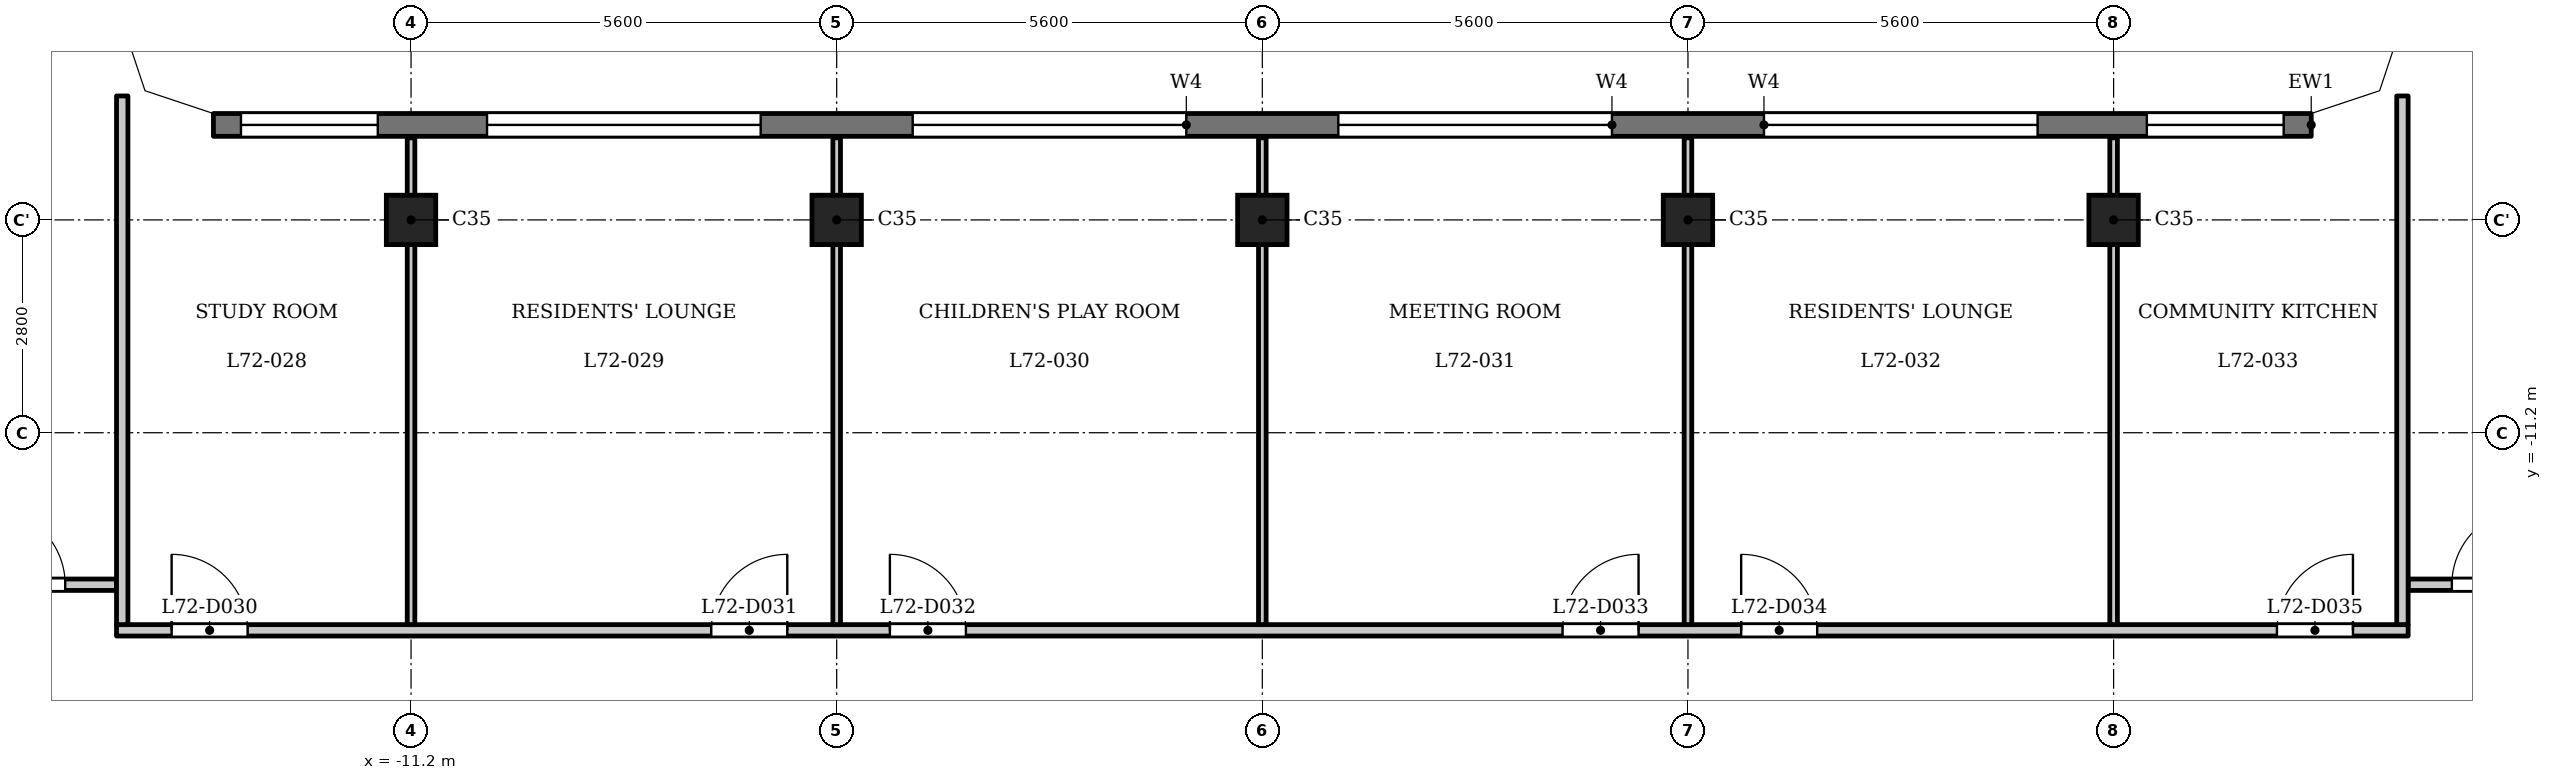
"""IFC4 building model, lengths in metres.
Left out: names, types, materials, properties, quantities, classifications, styles, units other than length and angle.
Written with IfcOpenShell. Run it as: python <this file> out.ifc"""

import sys

from ifc_helpers import new_model, si_unit, direction, frame, frame_2d, origin, origin_2d, place, context, subcontext, project, spatial, polyline, rectangle, outline, extrude, element, fill, save


model = new_model("IFC4")
c1 = context("Model", 3, precision=1e-05, world=origin(), true_north=direction((0.0, 1.0)))
c2 = subcontext(c1, "Body", "Model", "MODEL_VIEW")
j1 = project(units=[si_unit("LENGTHUNIT", "METRE"), si_unit("PLANEANGLEUNIT", "RADIAN")], contexts=[c1])
p1 = place(None, origin())
s1 = spatial("IfcSite", under=j1, at=p1, CompositionType="ELEMENT")
p2 = place(p1, origin())
s2 = spatial("IfcBuilding", under=s1, at=p2, CompositionType="ELEMENT")
p3 = place(p2, frame((0.0, 0.0, 276.7)))
s3 = spatial("IfcBuildingStorey", under=s2, at=p3, CompositionType="ELEMENT", Elevation=276.7)
for number, where, z_axis, x_axis in (
    (1, (-11.2, -8.4, 0.0), (0.0, 0.0, 1.0), (1.0, 0.0, 0.0)),
    (2, (-5.6, -8.4, 0.0), (0.0, 0.0, 1.0), (1.0, 0.0, 0.0)),
    (3, (0.0, -8.4, 0.0), (0.0, 0.0, 1.0), (1.0, 0.0, 0.0)),
    (4, (5.6, -8.4, 0.0), (0.0, 0.0, 1.0), (1.0, 0.0, 0.0)),
    (5, (11.2, -8.4, 0.0), (0.0, 0.0, 1.0), (1.0, 0.0, 0.0)),
):
    element("IfcColumn", number, at=place(p3, frame(where, z_axis=z_axis, x_axis=x_axis)), inside=s3, PredefinedType="COLUMN", context=c2, shape_type="SweptSolid", body=[
        extrude(rectangle(XDim=0.65, YDim=0.65, at=origin_2d()), origin(), (0.0, 0.0, 1.0), 3.5),
    ])
p4 = place(p3, frame((13.8, -7.15, 0.0), z_axis=(0.0, 0.0, 1.0), x_axis=(-1.0, 0.0, 0.0)))
e6 = element("IfcWall", 6, at=p4, inside=s3, PredefinedType="SOLIDWALL", context=c2, shape_type="SweptSolid", body=[
    extrude(rectangle(XDim=27.6, YDim=0.3, at=frame_2d((13.8, 0.0))), origin(), (0.0, 0.0, 1.0), 3.2),
])
p5 = place(p4, frame((0.363, 0.0, 0.9)))
e7 = element("IfcOpeningElement", 7, at=p5, cuts=e6, PredefinedType="OPENING", context=c2, shape_type="SweptSolid", body=[
    extrude(rectangle(XDim=1.8, YDim=1.25, at=frame_2d((0.9, 0.625))), frame((0.0, 0.16, 0.0), z_axis=(0.0, -1.0, 0.0), x_axis=(1.0, 0.0, 0.0)), (0.0, 0.0, 1.0), 0.32),
])
p6 = place(p4, frame((3.6, 0.0, 1.2)))
e8 = element("IfcOpeningElement", 8, at=p6, cuts=e6, PredefinedType="OPENING", context=c2, shape_type="SweptSolid", body=[
    extrude(rectangle(XDim=3.6, YDim=0.95, at=frame_2d((1.8, 0.475))), frame((0.0, 0.16, 0.0), z_axis=(0.0, -1.0, 0.0), x_axis=(1.0, 0.0, 0.0)), (0.0, 0.0, 1.0), 0.32),
])
p7 = place(p4, frame((9.2, 0.0, 1.2)))
e9 = element("IfcOpeningElement", 9, at=p7, cuts=e6, PredefinedType="OPENING", context=c2, shape_type="SweptSolid", body=[
    extrude(rectangle(XDim=3.6, YDim=0.95, at=frame_2d((1.8, 0.475))), frame((0.0, 0.16, 0.0), z_axis=(0.0, -1.0, 0.0), x_axis=(1.0, 0.0, 0.0)), (0.0, 0.0, 1.0), 0.32),
])
p8 = place(p4, frame((14.8, 0.0, 1.2)))
e10 = element("IfcOpeningElement", 10, at=p8, cuts=e6, PredefinedType="OPENING", context=c2, shape_type="SweptSolid", body=[
    extrude(rectangle(XDim=3.6, YDim=0.95, at=frame_2d((1.8, 0.475))), frame((0.0, 0.16, 0.0), z_axis=(0.0, -1.0, 0.0), x_axis=(1.0, 0.0, 0.0)), (0.0, 0.0, 1.0), 0.32),
])
p9 = place(p4, frame((20.4, 0.0, 1.2)))
e11 = element("IfcOpeningElement", 11, at=p9, cuts=e6, PredefinedType="OPENING", context=c2, shape_type="SweptSolid", body=[
    extrude(rectangle(XDim=3.6, YDim=0.95, at=frame_2d((1.8, 0.475))), frame((0.0, 0.16, 0.0), z_axis=(0.0, -1.0, 0.0), x_axis=(1.0, 0.0, 0.0)), (0.0, 0.0, 1.0), 0.32),
])
p10 = place(p4, frame((25.438, 0.0, 0.9)))
e12 = element("IfcOpeningElement", 12, at=p10, cuts=e6, PredefinedType="OPENING", context=c2, shape_type="SweptSolid", body=[
    extrude(rectangle(XDim=1.8, YDim=1.25, at=frame_2d((0.9, 0.625))), frame((0.0, 0.16, 0.0), z_axis=(0.0, -1.0, 0.0), x_axis=(1.0, 0.0, 0.0)), (0.0, 0.0, 1.0), 0.32),
])
p11 = place(p3, frame((-15.075, -13.8, 0.0), z_axis=(0.0, 0.0, 1.0), x_axis=(1.0, 0.0, 0.0)))
e13 = element("IfcWall", 13, at=p11, inside=s3, PredefinedType="PARTITIONING", context=c2, shape_type="SweptSolid", body=[
    extrude(rectangle(XDim=30.15, YDim=0.15, at=frame_2d((15.075, 0.0))), origin(), (0.0, 0.0, 1.0), 3.2),
])
p12 = place(p11, frame((0.725, 0.0, 0.0)))
e14 = element("IfcOpeningElement", 14, at=p12, cuts=e13, PredefinedType="OPENING", context=c2, shape_type="SweptSolid", body=[
    extrude(rectangle(XDim=1.0, YDim=2.1, at=frame_2d((0.5, 1.05))), frame((0.0, 0.085, 0.0), z_axis=(0.0, -1.0, 0.0), x_axis=(1.0, 0.0, 0.0)), (0.0, 0.0, 1.0), 0.17),
])
p13 = place(p11, frame((7.825, 0.0, 0.0)))
e15 = element("IfcOpeningElement", 15, at=p13, cuts=e13, PredefinedType="OPENING", context=c2, shape_type="SweptSolid", body=[
    extrude(rectangle(XDim=1.0, YDim=2.1, at=frame_2d((0.5, 1.05))), frame((0.0, 0.085, 0.0), z_axis=(0.0, -1.0, 0.0), x_axis=(1.0, 0.0, 0.0)), (0.0, 0.0, 1.0), 0.17),
])
p14 = place(p11, frame((10.175, 0.0, 0.0)))
e16 = element("IfcOpeningElement", 16, at=p14, cuts=e13, PredefinedType="OPENING", context=c2, shape_type="SweptSolid", body=[
    extrude(rectangle(XDim=1.0, YDim=2.1, at=frame_2d((0.5, 1.05))), frame((0.0, 0.085, 0.0), z_axis=(0.0, -1.0, 0.0), x_axis=(1.0, 0.0, 0.0)), (0.0, 0.0, 1.0), 0.17),
])
p15 = place(p11, frame((19.025, 0.0, 0.0)))
e17 = element("IfcOpeningElement", 17, at=p15, cuts=e13, PredefinedType="OPENING", context=c2, shape_type="SweptSolid", body=[
    extrude(rectangle(XDim=1.0, YDim=2.1, at=frame_2d((0.5, 1.05))), frame((0.0, 0.085, 0.0), z_axis=(0.0, -1.0, 0.0), x_axis=(1.0, 0.0, 0.0)), (0.0, 0.0, 1.0), 0.17),
])
p16 = place(p11, frame((21.375, 0.0, 0.0)))
e18 = element("IfcOpeningElement", 18, at=p16, cuts=e13, PredefinedType="OPENING", context=c2, shape_type="SweptSolid", body=[
    extrude(rectangle(XDim=1.0, YDim=2.1, at=frame_2d((0.5, 1.05))), frame((0.0, 0.085, 0.0), z_axis=(0.0, -1.0, 0.0), x_axis=(1.0, 0.0, 0.0)), (0.0, 0.0, 1.0), 0.17),
])
p17 = place(p11, frame((28.424, 0.0, 0.0)))
e19 = element("IfcOpeningElement", 19, at=p17, cuts=e13, PredefinedType="OPENING", context=c2, shape_type="SweptSolid", body=[
    extrude(rectangle(XDim=1.0, YDim=2.1, at=frame_2d((0.5, 1.05))), frame((0.0, 0.085, 0.0), z_axis=(0.0, -1.0, 0.0), x_axis=(1.0, 0.0, 0.0)), (0.0, 0.0, 1.0), 0.17),
])
p18 = place(p3, frame((-17.4, -13.2, 0.0), z_axis=(0.0, 0.0, 1.0), x_axis=(1.0, 0.0, 0.0)))
e20 = element("IfcWall", 20, at=p18, inside=s3, PredefinedType="PARTITIONING", context=c2, shape_type="SweptSolid", body=[
    extrude(rectangle(XDim=2.325, YDim=0.15, at=frame_2d((1.163, 0.0))), origin(), (0.0, 0.0, 1.0), 3.2),
])
p19 = place(p18, frame((0.65, 0.0, 0.0)))
e21 = element("IfcOpeningElement", 21, at=p19, cuts=e20, PredefinedType="OPENING", context=c2, shape_type="SweptSolid", body=[
    extrude(rectangle(XDim=1.0, YDim=2.1, at=frame_2d((0.5, 1.05))), frame((0.0, 0.085, 0.0), z_axis=(0.0, -1.0, 0.0), x_axis=(1.0, 0.0, 0.0)), (0.0, 0.0, 1.0), 0.17),
])
p20 = place(p3, frame((15.075, -13.2, 0.0), z_axis=(0.0, 0.0, 1.0), x_axis=(1.0, 0.0, 0.0)))
e22 = element("IfcWall", 22, at=p20, inside=s3, PredefinedType="PARTITIONING", context=c2, shape_type="SweptSolid", body=[
    extrude(rectangle(XDim=2.325, YDim=0.15, at=frame_2d((1.163, 0.0))), origin(), (0.0, 0.0, 1.0), 3.2),
])
p21 = place(p20, frame((0.575, 0.0, 0.0)))
e23 = element("IfcOpeningElement", 23, at=p21, cuts=e22, PredefinedType="OPENING", context=c2, shape_type="SweptSolid", body=[
    extrude(rectangle(XDim=1.0, YDim=2.1, at=frame_2d((0.5, 1.05))), frame((0.0, 0.085, 0.0), z_axis=(0.0, -1.0, 0.0), x_axis=(1.0, 0.0, 0.0)), (0.0, 0.0, 1.0), 0.17),
])
p22 = place(p3, frame((-15.0, -13.725, 0.0), z_axis=(0.0, 0.0, 1.0), x_axis=(0.0, 1.0, 0.0)))
e24 = element("IfcWall", 24, at=p22, inside=s3, PredefinedType="PARTITIONING", context=c2, shape_type="SweptSolid", body=[
    extrude(rectangle(XDim=6.956, YDim=0.15, at=frame_2d((3.478, 0.0))), origin(), (0.0, 0.0, 1.0), 3.2),
])
for number, where, z_axis, x_axis in (
    (25, (-11.2, -13.725, 0.0), (0.0, 0.0, 1.0), (0.0, 1.0, 0.0)),
    (26, (-5.6, -13.725, 0.0), (0.0, 0.0, 1.0), (0.0, 1.0, 0.0)),
    (27, (0.0, -13.725, 0.0), (0.0, 0.0, 1.0), (0.0, 1.0, 0.0)),
    (28, (5.6, -13.725, 0.0), (0.0, 0.0, 1.0), (0.0, 1.0, 0.0)),
    (29, (11.2, -13.725, 0.0), (0.0, 0.0, 1.0), (0.0, 1.0, 0.0)),
):
    element("IfcWall", number, at=place(p3, frame(where, z_axis=z_axis, x_axis=x_axis)), inside=s3, PredefinedType="PARTITIONING", context=c2, shape_type="SweptSolid", body=[
        extrude(rectangle(XDim=6.405, YDim=0.1, at=frame_2d((3.203, 0.0))), origin(), (0.0, 0.0, 1.0), 3.2),
    ])
p23 = place(p3, frame((15.0, -13.725, 0.0), z_axis=(0.0, 0.0, 1.0), x_axis=(0.0, 1.0, 0.0)))
e30 = element("IfcWall", 30, at=p23, inside=s3, PredefinedType="PARTITIONING", context=c2, shape_type="SweptSolid", body=[
    extrude(rectangle(XDim=6.956, YDim=0.15, at=frame_2d((3.478, 0.0))), origin(), (0.0, 0.0, 1.0), 3.2),
])
p24 = place(p3, origin())
e31 = element("IfcWall", 31, at=p24, inside=s3, PredefinedType="SOLIDWALL", context=c2, shape_type="SweptSolid", body=[
    extrude(outline(polyline([(14.937, -6.937), (15.3, -5.849), (15.3, -5.8), (15.0, -5.8), (14.7, -6.7), (13.8, -7.0), (13.8, -7.3), (13.849, -7.3), (14.937, -6.937)])), origin(), (0.0, 0.0, 1.0), 3.2),
])
e32 = element("IfcWall", 32, at=p24, inside=s3, PredefinedType="SOLIDWALL", context=c2, shape_type="SweptSolid", body=[
    extrude(outline(polyline([(-14.937, -6.937), (-13.849, -7.3), (-13.8, -7.3), (-13.8, -7.0), (-14.7, -6.7), (-15.0, -5.8), (-15.3, -5.8), (-15.3, -5.849), (-14.937, -6.937)])), origin(), (0.0, 0.0, 1.0), 3.2),
])
p25 = place(p19, origin())
e33 = element("IfcDoor", 33, at=p25, inside=s3, OperationType="SINGLE_SWING_RIGHT", PredefinedType="DOOR", context=c2, shape_type="SweptSolid", body=[
    extrude(rectangle(XDim=1.0, YDim=2.1, at=frame_2d((0.5, 1.05))), frame((0.0, 0.025, 0.0), z_axis=(0.0, -1.0, 0.0), x_axis=(1.0, 0.0, 0.0)), (0.0, 0.0, 1.0), 0.05),
])
fill(e21, e33)
p26 = place(p21, origin())
e34 = element("IfcDoor", 34, at=p26, inside=s3, OperationType="SINGLE_SWING_LEFT", PredefinedType="DOOR", context=c2, shape_type="SweptSolid", body=[
    extrude(rectangle(XDim=1.0, YDim=2.1, at=frame_2d((0.5, 1.05))), frame((0.0, 0.025, 0.0), z_axis=(0.0, -1.0, 0.0), x_axis=(1.0, 0.0, 0.0)), (0.0, 0.0, 1.0), 0.05),
])
fill(e23, e34)
p27 = place(p12, origin())
e35 = element("IfcDoor", 35, at=p27, inside=s3, OperationType="SINGLE_SWING_RIGHT", PredefinedType="DOOR", context=c2, shape_type="SweptSolid", body=[
    extrude(rectangle(XDim=1.0, YDim=2.1, at=frame_2d((0.5, 1.05))), frame((0.0, 0.025, 0.0), z_axis=(0.0, -1.0, 0.0), x_axis=(1.0, 0.0, 0.0)), (0.0, 0.0, 1.0), 0.05),
])
fill(e14, e35)
p28 = place(p13, origin())
e36 = element("IfcDoor", 36, at=p28, inside=s3, OperationType="SINGLE_SWING_LEFT", PredefinedType="DOOR", context=c2, shape_type="SweptSolid", body=[
    extrude(rectangle(XDim=1.0, YDim=2.1, at=frame_2d((0.5, 1.05))), frame((0.0, 0.025, 0.0), z_axis=(0.0, -1.0, 0.0), x_axis=(1.0, 0.0, 0.0)), (0.0, 0.0, 1.0), 0.05),
])
fill(e15, e36)
p29 = place(p14, origin())
e37 = element("IfcDoor", 37, at=p29, inside=s3, OperationType="SINGLE_SWING_RIGHT", PredefinedType="DOOR", context=c2, shape_type="SweptSolid", body=[
    extrude(rectangle(XDim=1.0, YDim=2.1, at=frame_2d((0.5, 1.05))), frame((0.0, 0.025, 0.0), z_axis=(0.0, -1.0, 0.0), x_axis=(1.0, 0.0, 0.0)), (0.0, 0.0, 1.0), 0.05),
])
fill(e16, e37)
p30 = place(p15, origin())
e38 = element("IfcDoor", 38, at=p30, inside=s3, OperationType="SINGLE_SWING_LEFT", PredefinedType="DOOR", context=c2, shape_type="SweptSolid", body=[
    extrude(rectangle(XDim=1.0, YDim=2.1, at=frame_2d((0.5, 1.05))), frame((0.0, 0.025, 0.0), z_axis=(0.0, -1.0, 0.0), x_axis=(1.0, 0.0, 0.0)), (0.0, 0.0, 1.0), 0.05),
])
fill(e17, e38)
p31 = place(p16, origin())
e39 = element("IfcDoor", 39, at=p31, inside=s3, OperationType="SINGLE_SWING_RIGHT", PredefinedType="DOOR", context=c2, shape_type="SweptSolid", body=[
    extrude(rectangle(XDim=1.0, YDim=2.1, at=frame_2d((0.5, 1.05))), frame((0.0, 0.025, 0.0), z_axis=(0.0, -1.0, 0.0), x_axis=(1.0, 0.0, 0.0)), (0.0, 0.0, 1.0), 0.05),
])
fill(e18, e39)
p32 = place(p17, origin())
e40 = element("IfcDoor", 40, at=p32, inside=s3, OperationType="SINGLE_SWING_LEFT", PredefinedType="DOOR", context=c2, shape_type="SweptSolid", body=[
    extrude(rectangle(XDim=1.0, YDim=2.1, at=frame_2d((0.5, 1.05))), frame((0.0, 0.025, 0.0), z_axis=(0.0, -1.0, 0.0), x_axis=(1.0, 0.0, 0.0)), (0.0, 0.0, 1.0), 0.05),
])
fill(e19, e40)
p33 = place(p5, origin())
e41 = element("IfcWindow", 41, at=p33, inside=s3, PartitioningType="SINGLE_PANEL", PredefinedType="WINDOW", context=c2, shape_type="SweptSolid", body=[
    extrude(rectangle(XDim=1.8, YDim=1.25, at=frame_2d((0.9, 0.625))), frame((0.0, 0.03, 0.0), z_axis=(0.0, -1.0, 0.0), x_axis=(1.0, 0.0, 0.0)), (0.0, 0.0, 1.0), 0.06),
])
fill(e7, e41)
p34 = place(p6, origin())
e42 = element("IfcWindow", 42, at=p34, inside=s3, PartitioningType="SINGLE_PANEL", PredefinedType="WINDOW", context=c2, shape_type="SweptSolid", body=[
    extrude(rectangle(XDim=3.6, YDim=0.95, at=frame_2d((1.8, 0.475))), frame((0.0, 0.03, 0.0), z_axis=(0.0, -1.0, 0.0), x_axis=(1.0, 0.0, 0.0)), (0.0, 0.0, 1.0), 0.06),
])
fill(e8, e42)
p35 = place(p7, origin())
e43 = element("IfcWindow", 43, at=p35, inside=s3, PartitioningType="SINGLE_PANEL", PredefinedType="WINDOW", context=c2, shape_type="SweptSolid", body=[
    extrude(rectangle(XDim=3.6, YDim=0.95, at=frame_2d((1.8, 0.475))), frame((0.0, 0.03, 0.0), z_axis=(0.0, -1.0, 0.0), x_axis=(1.0, 0.0, 0.0)), (0.0, 0.0, 1.0), 0.06),
])
fill(e9, e43)
p36 = place(p8, origin())
e44 = element("IfcWindow", 44, at=p36, inside=s3, PartitioningType="SINGLE_PANEL", PredefinedType="WINDOW", context=c2, shape_type="SweptSolid", body=[
    extrude(rectangle(XDim=3.6, YDim=0.95, at=frame_2d((1.8, 0.475))), frame((0.0, 0.03, 0.0), z_axis=(0.0, -1.0, 0.0), x_axis=(1.0, 0.0, 0.0)), (0.0, 0.0, 1.0), 0.06),
])
fill(e10, e44)
p37 = place(p9, origin())
e45 = element("IfcWindow", 45, at=p37, inside=s3, PartitioningType="SINGLE_PANEL", PredefinedType="WINDOW", context=c2, shape_type="SweptSolid", body=[
    extrude(rectangle(XDim=3.6, YDim=0.95, at=frame_2d((1.8, 0.475))), frame((0.0, 0.03, 0.0), z_axis=(0.0, -1.0, 0.0), x_axis=(1.0, 0.0, 0.0)), (0.0, 0.0, 1.0), 0.06),
])
fill(e11, e45)
p38 = place(p10, origin())
e46 = element("IfcWindow", 46, at=p38, inside=s3, PartitioningType="SINGLE_PANEL", PredefinedType="WINDOW", context=c2, shape_type="SweptSolid", body=[
    extrude(rectangle(XDim=1.8, YDim=1.25, at=frame_2d((0.9, 0.625))), frame((0.0, 0.03, 0.0), z_axis=(0.0, -1.0, 0.0), x_axis=(1.0, 0.0, 0.0)), (0.0, 0.0, 1.0), 0.06),
])
fill(e12, e46)
save(model, sys.argv[1])
